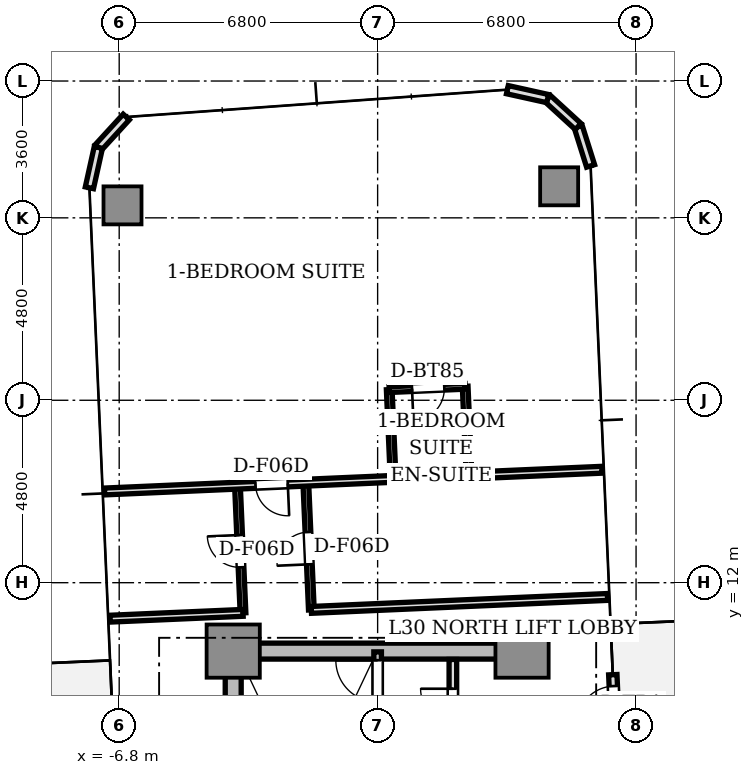
"""IFC4 building model, lengths in metres.
Left out: names, types, materials, properties, quantities, classifications, styles, units other than length and angle.
Written with IfcOpenShell. Run it as: python <this file> out.ifc"""

import sys

from ifc_helpers import new_model, si_unit, direction, frame, frame_2d, origin, origin_2d, place, context, subcontext, project, spatial, rectangle, extrude, source, transform, mapped, element, fill, save


model = new_model("IFC4")
c1 = context("Model", 3, precision=1e-05, world=origin(), true_north=direction((0.0, 1.0)))
c2 = subcontext(c1, "Body", "Model", "MODEL_VIEW")
j1 = project(units=[si_unit("LENGTHUNIT", "METRE"), si_unit("PLANEANGLEUNIT", "RADIAN")], contexts=[c1])
p1 = place(None, origin())
s1 = spatial("IfcSite", under=j1, at=p1, CompositionType="ELEMENT")
p2 = place(p1, origin())
s2 = spatial("IfcBuilding", under=s1, at=p2, CompositionType="ELEMENT")
p3 = place(p2, frame((0.0, 0.0, 111.45)))
s3 = spatial("IfcBuildingStorey", under=s2, at=p3, CompositionType="ELEMENT", Elevation=111.45)
p4 = place(p3, frame((-3.55, 10.2, 0.0), z_axis=(0.0, 0.0, 1.0), x_axis=(1.0, 0.0, 0.0)))
e1 = element("IfcWall", 1, at=p4, inside=s3, PredefinedType="SHEAR", context=c2, shape_type="SweptSolid", body=[
    extrude(rectangle(XDim=7.1, YDim=0.42, at=frame_2d((3.55, 0.0))), origin(), (0.0, 0.0, 1.0), 3.11),
])
p5 = place(p3, frame((-3.8, 2.85, 0.0), z_axis=(0.0, 0.0, 1.0), x_axis=(0.0, 1.0, 0.0)))
e2 = element("IfcWall", 2, at=p5, inside=s3, PredefinedType="SHEAR", context=c2, shape_type="SweptSolid", body=[
    extrude(rectangle(XDim=6.9, YDim=0.42, at=frame_2d((3.45, 0.0))), origin(), (0.0, 0.0, 1.0), 3.11),
])
m1 = source(origin(), c2, "Body", "SweptSolid", [
    extrude(rectangle(XDim=1.4, YDim=1.4, at=origin_2d()), origin(), (0.0, 0.0, 1.0), 3.11),
])
for number, where, z_axis, x_axis in (
    (3, (-3.8, 10.2, 0.0), (0.0, 0.0, 1.0), (1.0, 0.0, 0.0)),
    (4, (3.8, 10.2, 0.0), (0.0, 0.0, 1.0), (1.0, 0.0, 0.0)),
):
    element("IfcColumn", number, at=place(p3, frame(where, z_axis=z_axis, x_axis=x_axis)), inside=s3, PredefinedType="COLUMN", context=c2, shape_type="MappedRepresentation", body=[
        mapped(m1, transform((0.0, 0.0, 0.0), scale=1.0)),
    ])
m2 = source(origin(), c2, "Body", "SweptSolid", [
    extrude(rectangle(XDim=1.0, YDim=1.0, at=origin_2d()), origin(), (0.0, 0.0, 1.0), 3.11),
])
for number, where, z_axis, x_axis in (
    (5, (4.776, 22.43, 0.0), (0.0, 0.0, 1.0), (1.0, 0.0, 0.0)),
    (6, (-6.713, 21.928, 0.0), (0.0, 0.0, 1.0), (1.0, 0.0, 0.0)),
):
    element("IfcColumn", number, at=place(p3, frame(where, z_axis=z_axis, x_axis=x_axis)), inside=s3, PredefinedType="COLUMN", context=c2, shape_type="MappedRepresentation", body=[
        mapped(m2, transform((0.0, 0.0, 0.0), scale=1.0)),
    ])
p6 = place(p3, frame((6.306, 6.882, 0.0), z_axis=(0.0, 0.0, 1.0), x_axis=(-0.043672655174, 0.999045894436, 0.0)))
e7 = element("IfcWall", 7, at=p6, inside=s3, PredefinedType="STANDARD", context=c2, shape_type="SweptSolid", body=[
    extrude(rectangle(XDim=2.7, YDim=0.22, at=frame_2d((1.35, 0.0))), origin(), (0.0, 0.0, 1.0), 3.11),
])
p7 = place(p6, frame((1.4, 0.0, 0.0)))
e8 = element("IfcOpeningElement", 8, at=p7, cuts=e7, PredefinedType="OPENING", context=c2, shape_type="SweptSolid", body=[
    extrude(rectangle(XDim=1.0, YDim=2.2, at=frame_2d((0.5, 1.1))), frame((0.0, 0.12, 0.0), z_axis=(0.0, -1.0, 0.0), x_axis=(1.0, 0.0, 0.0)), (0.0, 0.0, 1.0), 0.24),
])
p8 = place(p3, frame((5.604, 22.966, 0.0), z_axis=(0.0, 0.0, 1.0), x_axis=(-0.300755105707, 0.953701403161, 0.0)))
e9 = element("IfcWall", 9, at=p8, inside=s3, PredefinedType="STANDARD", context=c2, shape_type="SweptSolid", body=[
    extrude(rectangle(XDim=1.087, YDim=0.22, at=frame_2d((0.543, 0.0))), origin(), (0.0, 0.0, 1.0), 3.11),
])
p9 = place(p3, frame((5.277, 24.003, 0.0), z_axis=(0.0, 0.0, 1.0), x_axis=(-0.737312600672, 0.675551721847, 0.0)))
e10 = element("IfcWall", 10, at=p9, inside=s3, PredefinedType="STANDARD", context=c2, shape_type="SweptSolid", body=[
    extrude(rectangle(XDim=1.087, YDim=0.22, at=frame_2d((0.543, 0.0))), origin(), (0.0, 0.0, 1.0), 3.11),
])
for number, where, z_axis, x_axis in (
    (11, (4.475, 24.737, 0.0), (0.0, 0.0, 1.0), (-0.976, 0.217, 0.0)),
    (12, (-6.614, 24.253, 0.0), (0.0, 0.0, 1.0), (-0.676, -0.737, 0.0)),
):
    element("IfcWall", number, at=place(p3, frame(where, z_axis=z_axis, x_axis=x_axis)), inside=s3, PredefinedType="STANDARD", context=c2, shape_type="SweptSolid", body=[
        extrude(rectangle(XDim=1.087, YDim=0.22, at=frame_2d((0.543, 0.0))), origin(), (0.0, 0.0, 1.0), 3.11),
    ])
p10 = place(p3, frame((-7.349, 23.452, 0.0), z_axis=(0.0, 0.0, 1.0), x_axis=(-0.216454939174, -0.976292609471, 0.0)))
e13 = element("IfcWall", 13, at=p10, inside=s3, PredefinedType="STANDARD", context=c2, shape_type="SweptSolid", body=[
    extrude(rectangle(XDim=1.087, YDim=0.22, at=frame_2d((0.544, 0.0))), origin(), (0.0, 0.0, 1.0), 3.11),
])
p11 = place(p3, frame((0.0, 2.5, 0.0), z_axis=(0.0, 0.0, 1.0), x_axis=(0.0, 1.0, 0.0)))
e14 = element("IfcWall", 14, at=p11, inside=s3, PredefinedType="SOLIDWALL", context=c2, shape_type="SweptSolid", body=[
    extrude(rectangle(XDim=7.68, YDim=0.2, at=frame_2d((3.84, 0.0))), origin(), (0.0, 0.0, 1.0), 3.11),
])
p12 = place(p11, frame((6.36, 0.0, 0.0)))
e15 = element("IfcOpeningElement", 15, at=p12, cuts=e14, PredefinedType="OPENING", context=c2, shape_type="SweptSolid", body=[
    extrude(rectangle(XDim=1.1, YDim=2.15, at=frame_2d((0.55, 1.075))), frame((0.0, 0.11, 0.0), z_axis=(0.0, -1.0, 0.0), x_axis=(1.0, 0.0, 0.0)), (0.0, 0.0, 1.0), 0.22),
])
p13 = place(p3, frame((1.98, 5.32, 0.0), z_axis=(0.0, 0.0, 1.0), x_axis=(0.0, 1.0, 0.0)))
e16 = element("IfcWall", 16, at=p13, inside=s3, PredefinedType="SOLIDWALL", context=c2, shape_type="SweptSolid", body=[
    extrude(rectangle(XDim=4.66, YDim=0.2, at=frame_2d((2.33, 0.0))), origin(), (0.0, 0.0, 1.0), 2.66),
])
p14 = place(p13, frame((3.04, 0.0, 0.0)))
e17 = element("IfcOpeningElement", 17, at=p14, cuts=e16, PredefinedType="OPENING", context=c2, shape_type="SweptSolid", body=[
    extrude(rectangle(XDim=0.85, YDim=2.1, at=frame_2d((0.425, 1.05))), frame((0.0, 0.11, 0.0), z_axis=(0.0, -1.0, 0.0), x_axis=(1.0, 0.0, 0.0)), (0.0, 0.0, 1.0), 0.22),
])
p15 = place(p3, frame((-3.542, 11.206, 0.0), z_axis=(0.0, 0.0, 1.0), x_axis=(-0.043582710367, 0.99904982226, 0.0)))
e18 = element("IfcWall", 18, at=p15, inside=s3, PredefinedType="PARTITIONING", context=c2, shape_type="SweptSolid", body=[
    extrude(rectangle(XDim=3.35, YDim=0.15, at=frame_2d((1.675, 0.0))), origin(), (0.0, 0.0, 1.0), 2.66),
])
p16 = place(p15, frame((1.2, 0.0, 0.0)))
e19 = element("IfcOpeningElement", 19, at=p16, cuts=e18, PredefinedType="OPENING", context=c2, shape_type="SweptSolid", body=[
    extrude(rectangle(XDim=0.85, YDim=2.1, at=frame_2d((0.425, 1.05))), frame((0.0, 0.085, 0.0), z_axis=(0.0, -1.0, 0.0), x_axis=(1.0, 0.0, 0.0)), (0.0, 0.0, 1.0), 0.17),
])
p17 = place(p3, frame((-1.744, 11.285, 0.0), z_axis=(0.0, 0.0, 1.0), x_axis=(-0.043579537274, 0.999049960678, 0.0)))
e20 = element("IfcWall", 20, at=p17, inside=s3, PredefinedType="PARTITIONING", context=c2, shape_type="SweptSolid", body=[
    extrude(rectangle(XDim=3.35, YDim=0.15, at=frame_2d((1.675, 0.0))), origin(), (0.0, 0.0, 1.0), 2.66),
])
p18 = place(p17, frame((1.2, 0.0, 0.0)))
e21 = element("IfcOpeningElement", 21, at=p18, cuts=e20, PredefinedType="OPENING", context=c2, shape_type="SweptSolid", body=[
    extrude(rectangle(XDim=0.85, YDim=2.1, at=frame_2d((0.425, 1.05))), frame((0.0, 0.085, 0.0), z_axis=(0.0, -1.0, 0.0), x_axis=(1.0, 0.0, 0.0)), (0.0, 0.0, 1.0), 0.17),
])
p19 = place(p3, frame((-3.542, 11.206, 0.0), z_axis=(0.0, 0.0, 1.0), x_axis=(-0.999046129111, -0.04366728647, 0.0)))
e22 = element("IfcWall", 22, at=p19, inside=s3, PredefinedType="PARTITIONING", context=c2, shape_type="SweptSolid", body=[
    extrude(rectangle(XDim=3.5, YDim=0.18, at=frame_2d((1.75, 0.0))), origin(), (0.0, 0.0, 1.0), 2.66),
])
p20 = place(p3, frame((6.049, 11.625, 0.0), z_axis=(0.0, 0.0, 1.0), x_axis=(-0.999047634936, -0.043632821702, 0.0)))
e23 = element("IfcWall", 23, at=p20, inside=s3, PredefinedType="PARTITIONING", context=c2, shape_type="SweptSolid", body=[
    extrude(rectangle(XDim=7.8, YDim=0.18, at=frame_2d((3.9, 0.0))), origin(), (0.0, 0.0, 1.0), 2.66),
])
p21 = place(p3, frame((5.903, 14.972, 0.0), z_axis=(0.0, 0.0, 1.0), x_axis=(-0.999048653727, -0.043609488494, 0.0)))
e24 = element("IfcWall", 24, at=p21, inside=s3, PredefinedType="PARTITIONING", context=c2, shape_type="SweptSolid", body=[
    extrude(rectangle(XDim=13.1, YDim=0.18, at=frame_2d((6.55, 0.0))), origin(), (0.0, 0.0, 1.0), 2.66),
])
p22 = place(p21, frame((8.275, 0.0, 0.0)))
e25 = element("IfcOpeningElement", 25, at=p22, cuts=e24, PredefinedType="OPENING", context=c2, shape_type="SweptSolid", body=[
    extrude(rectangle(XDim=0.85, YDim=2.1, at=frame_2d((0.425, 1.05))), frame((0.0, 0.1, 0.0), z_axis=(0.0, -1.0, 0.0), x_axis=(1.0, 0.0, 0.0)), (0.0, 0.0, 1.0), 0.2),
])
p23 = place(p3, frame((0.408, 14.732, 0.0), z_axis=(0.0, 0.0, 1.0), x_axis=(-0.043527387554, 0.999052234136, 0.0)))
e26 = element("IfcWall", 26, at=p23, inside=s3, PredefinedType="PARTITIONING", context=c2, shape_type="SweptSolid", body=[
    extrude(rectangle(XDim=2.35, YDim=0.15, at=frame_2d((1.175, 0.0))), origin(), (0.0, 0.0, 1.0), 2.66),
])
p24 = place(p3, frame((2.406, 14.819, 0.0), z_axis=(0.0, 0.0, 1.0), x_axis=(-0.04363560271, 0.999047513473, 0.0)))
e27 = element("IfcWall", 27, at=p24, inside=s3, PredefinedType="PARTITIONING", context=c2, shape_type="SweptSolid", body=[
    extrude(rectangle(XDim=2.35, YDim=0.15, at=frame_2d((1.175, 0.0))), origin(), (0.0, 0.0, 1.0), 2.66),
])
p25 = place(p3, frame((2.303, 17.167, 0.0), z_axis=(0.0, 0.0, 1.0), x_axis=(-0.999049929275, -0.043580257179, 0.0)))
e28 = element("IfcWall", 28, at=p25, inside=s3, PredefinedType="PARTITIONING", context=c2, shape_type="SweptSolid", body=[
    extrude(rectangle(XDim=2.0, YDim=0.15, at=frame_2d((1.0, 0.0))), origin(), (0.0, 0.0, 1.0), 2.66),
])
p26 = place(p25, frame((0.55, 0.0, 0.0)))
e29 = element("IfcOpeningElement", 29, at=p26, cuts=e28, PredefinedType="OPENING", context=c2, shape_type="SweptSolid", body=[
    extrude(rectangle(XDim=0.85, YDim=2.1, at=frame_2d((0.425, 1.05))), frame((0.0, 0.085, 0.0), z_axis=(0.0, -1.0, 0.0), x_axis=(1.0, 0.0, 0.0)), (0.0, 0.0, 1.0), 0.17),
])
m3 = source(origin(), c2, "Body", "SweptSolid", [
    extrude(rectangle(XDim=1.0, YDim=0.05, at=origin_2d()), origin(), (0.0, 0.0, 1.0), 2.2),
])
p27 = place(p7, frame((0.5, 0.0, 0.0)))
e30 = element("IfcDoor", 30, at=p27, inside=s3, OperationType="SINGLE_SWING_LEFT", PredefinedType="DOOR", context=c2, shape_type="MappedRepresentation", body=[
    mapped(m3, transform((0.0, 0.0, 0.0), scale=1.0)),
])
fill(e8, e30)
m4 = source(origin(), c2, "Body", "SweptSolid", [
    extrude(rectangle(XDim=1.1, YDim=0.05, at=origin_2d()), origin(), (0.0, 0.0, 1.0), 2.15),
])
p28 = place(p12, frame((0.55, 0.0, 0.0)))
e31 = element("IfcDoor", 31, at=p28, inside=s3, OperationType="SINGLE_SWING_RIGHT", PredefinedType="DOOR", context=c2, shape_type="MappedRepresentation", body=[
    mapped(m4, transform((0.0, 0.0, 0.0), scale=1.0)),
])
fill(e15, e31)
m5 = source(origin(), c2, "Body", "SweptSolid", [
    extrude(rectangle(XDim=0.85, YDim=0.05, at=origin_2d()), origin(), (0.0, 0.0, 1.0), 2.1),
])
p29 = place(p14, frame((0.425, 0.0, 0.0)))
e32 = element("IfcDoor", 32, at=p29, inside=s3, OperationType="SINGLE_SWING_RIGHT", PredefinedType="DOOR", context=c2, shape_type="MappedRepresentation", body=[
    mapped(m5, transform((0.0, 0.0, 0.0), scale=1.0)),
])
fill(e17, e32)
p30 = place(p16, frame((0.425, 0.0, 0.0)))
e33 = element("IfcDoor", 33, at=p30, inside=s3, OperationType="SINGLE_SWING_RIGHT", PredefinedType="DOOR", context=c2, shape_type="MappedRepresentation", body=[
    mapped(m5, transform((0.0, 0.0, 0.0), scale=1.0)),
])
fill(e19, e33)
p31 = place(p18, frame((0.425, 0.0, 0.0)))
e34 = element("IfcDoor", 34, at=p31, inside=s3, OperationType="SINGLE_SWING_LEFT", PredefinedType="DOOR", context=c2, shape_type="MappedRepresentation", body=[
    mapped(m5, transform((0.0, 0.0, 0.0), scale=1.0)),
])
fill(e21, e34)
p32 = place(p26, frame((0.425, 0.0, 0.0)))
e35 = element("IfcDoor", 35, at=p32, inside=s3, OperationType="SINGLE_SWING_RIGHT", PredefinedType="DOOR", context=c2, shape_type="MappedRepresentation", body=[
    mapped(m5, transform((0.0, 0.0, 0.0), scale=1.0)),
])
fill(e29, e35)
p33 = place(p22, frame((0.425, 0.0, 0.0)))
e36 = element("IfcDoor", 36, at=p33, inside=s3, OperationType="SINGLE_SWING_LEFT", PredefinedType="DOOR", context=c2, shape_type="MappedRepresentation", body=[
    mapped(m5, transform((0.0, 0.0, 0.0), scale=1.0)),
])
fill(e25, e36)
save(model, sys.argv[1])
